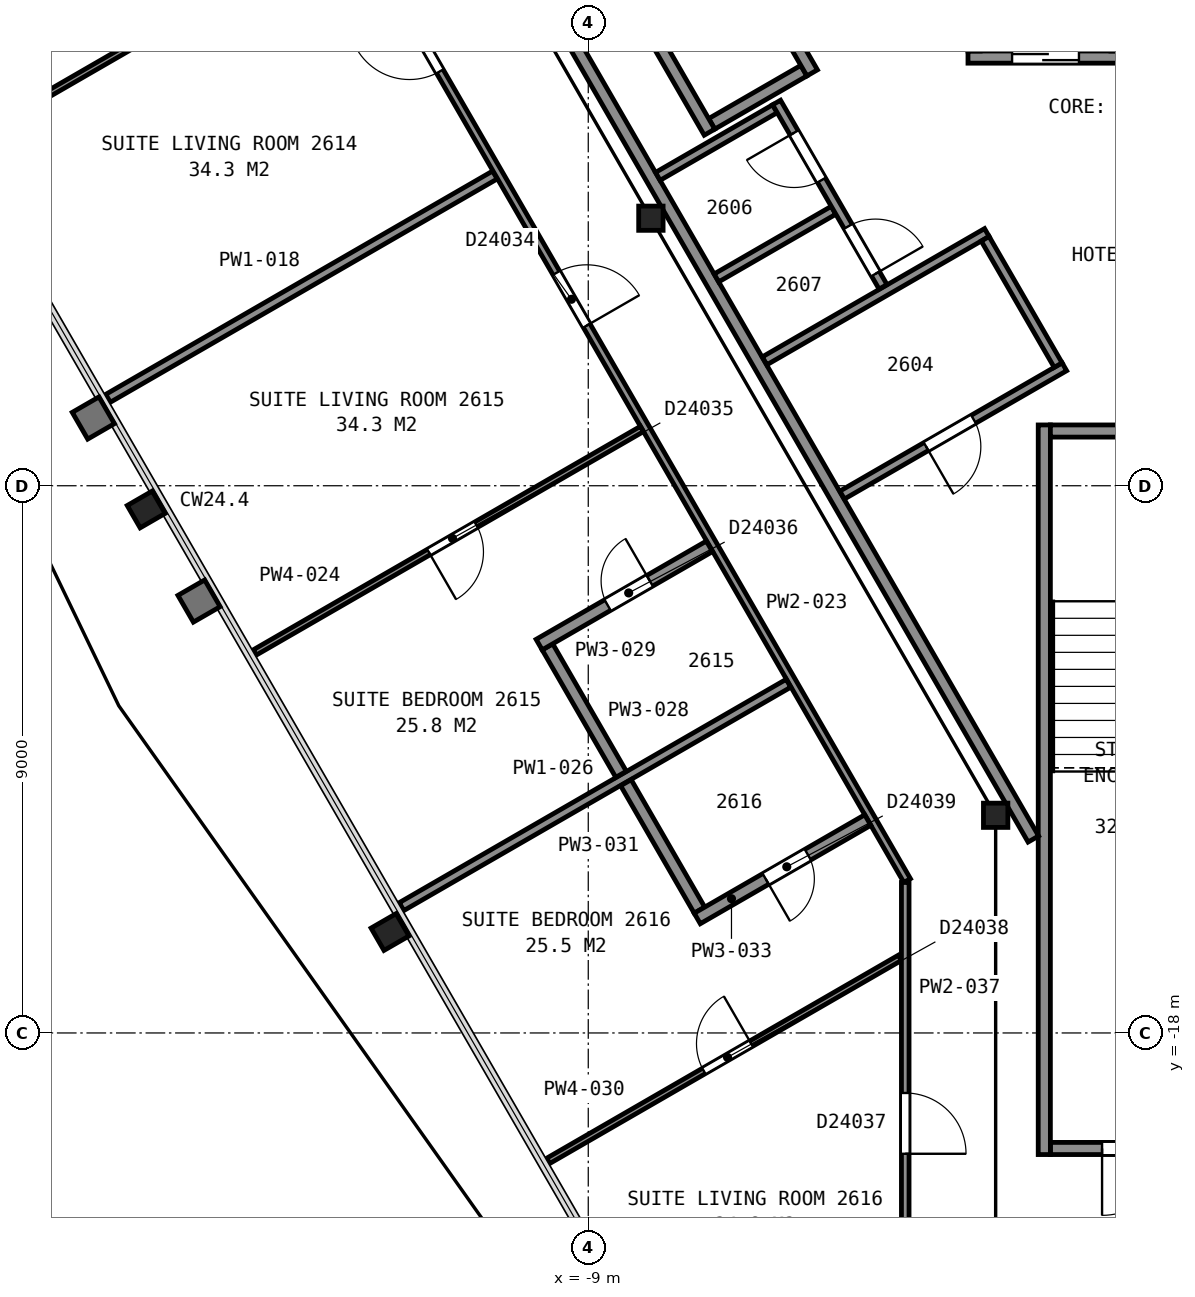
"""IFC4 building model, lengths in metres.
Left out: names, types, materials, properties, quantities, classifications, styles, units other than length and angle.
Written with IfcOpenShell. Run it as: python <this file> out.ifc"""

import sys

from ifc_helpers import new_model, si_unit, direction, frame, frame_2d, origin, origin_2d, place, context, subcontext, project, spatial, rectangle, i_section, extrude, element, fill, save


model = new_model("IFC4")
c1 = context("Model", 3, precision=1e-05, world=origin(), true_north=direction((0.0, 1.0)))
c2 = subcontext(c1, "Body", "Model", "MODEL_VIEW")
j1 = project(units=[si_unit("LENGTHUNIT", "METRE"), si_unit("PLANEANGLEUNIT", "RADIAN")], contexts=[c1])
p1 = place(None, origin())
s1 = spatial("IfcSite", under=j1, at=p1, CompositionType="ELEMENT")
p2 = place(p1, origin())
s2 = spatial("IfcBuilding", under=s1, at=p2, CompositionType="ELEMENT")
p3 = place(p2, frame((0.0, 0.0, 110.8)))
s3 = spatial("IfcBuildingStorey", under=s2, at=p3, CompositionType="ELEMENT", Elevation=110.8)
for number, where, z_axis, x_axis in (
    (1, (-16.27, -9.39, 0.0), (0.0, 0.0, 1.0), (-0.5, 0.866, 0.0)),
    (2, (-12.26, -16.34, 0.0), (0.0, 0.0, 1.0), (-0.5, 0.866, 0.0)),
):
    element("IfcColumn", number, at=place(p3, frame(where, z_axis=z_axis, x_axis=x_axis)), inside=s3, PredefinedType="COLUMN", context=c2, shape_type="SweptSolid", body=[
        extrude(i_section(OverallWidth=0.424, OverallDepth=0.475, WebThickness=0.048, FlangeThickness=0.077, FilletRadius=0.015, at=origin_2d()), origin(), (0.0, 0.0, 1.0), 3.6),
    ])
for number, where, z_axis, x_axis in (
    (3, (-7.97, -4.6, 0.0), (0.0, 0.0, 1.0), (1.0, 0.0, 0.0)),
    (4, (-2.3, -14.42, 0.0), (0.0, 0.0, 1.0), (1.0, 0.0, 0.0)),
):
    element("IfcColumn", number, at=place(p3, frame(where, z_axis=z_axis, x_axis=x_axis)), inside=s3, PredefinedType="COLUMN", context=c2, shape_type="SweptSolid", body=[
        extrude(i_section(OverallWidth=0.401, OverallDepth=0.399, WebThickness=0.025, FlangeThickness=0.04, FilletRadius=0.015, at=origin_2d()), origin(), (0.0, 0.0, 1.0), 3.6),
    ])
p4 = place(p3, frame((-1.4, -19.9, 0.0), z_axis=(0.0, 0.0, 1.0), x_axis=(1.0, 0.0, 0.0)))
e5 = element("IfcWall", 5, at=p4, inside=s3, PredefinedType="PARTITIONING", context=c2, shape_type="SweptSolid", body=[
    extrude(rectangle(XDim=2.8, YDim=0.2, at=frame_2d((1.4, 0.0))), origin(), (0.0, 0.0, 1.0), 3.35),
])
p5 = place(p4, frame((0.85, 0.0, 0.0)))
e6 = element("IfcOpeningElement", 6, at=p5, cuts=e5, PredefinedType="OPENING", context=c2, shape_type="SweptSolid", body=[
    extrude(rectangle(XDim=1.1, YDim=2.1, at=frame_2d((0.55, 1.05))), frame((0.0, 0.11, 0.0), z_axis=(0.0, -1.0, 0.0), x_axis=(1.0, 0.0, 0.0)), (0.0, 0.0, 1.0), 0.22),
])
p6 = place(p3, frame((-1.5, -8.0, 0.0), z_axis=(0.0, 0.0, 1.0), x_axis=(0.0, -1.0, 0.0)))
e7 = element("IfcWall", 7, at=p6, inside=s3, PredefinedType="PARTITIONING", context=c2, shape_type="SweptSolid", body=[
    extrude(rectangle(XDim=12.0, YDim=0.2, at=frame_2d((6.0, 0.0))), origin(), (0.0, 0.0, 1.0), 3.35),
])
p7 = place(p3, frame((-1.4, -8.1, 0.0), z_axis=(0.0, 0.0, 1.0), x_axis=(1.0, 0.0, 0.0)))
e8 = element("IfcWall", 8, at=p7, inside=s3, PredefinedType="PARTITIONING", context=c2, shape_type="SweptSolid", body=[
    extrude(rectangle(XDim=2.8, YDim=0.2, at=frame_2d((1.4, 0.0))), origin(), (0.0, 0.0, 1.0), 3.35),
])
p8 = place(p3, frame((-2.755, -1.95, 0.0), z_axis=(0.0, 0.0, 1.0), x_axis=(1.0, 0.0, 0.0)))
e9 = element("IfcWall", 9, at=p8, inside=s3, PredefinedType="PARTITIONING", context=c2, shape_type="SweptSolid", body=[
    extrude(rectangle(XDim=2.55, YDim=0.2, at=frame_2d((1.275, 0.0))), origin(), (0.0, 0.0, 1.0), 3.6),
])
p9 = place(p8, frame((0.725, 0.0, 0.0)))
e10 = element("IfcOpeningElement", 10, at=p9, cuts=e9, PredefinedType="OPENING", context=c2, shape_type="SweptSolid", body=[
    extrude(rectangle(XDim=1.1, YDim=2.1, at=frame_2d((0.55, 1.05))), frame((0.0, 0.11, 0.0), z_axis=(0.0, -1.0, 0.0), x_axis=(1.0, 0.0, 0.0)), (0.0, 0.0, 1.0), 0.22),
])
p10 = place(p3, frame((-6.97, -3.048, 0.0), z_axis=(0.0, 0.0, 1.0), x_axis=(0.866036909293, 0.499980071345, 0.0)))
e11 = element("IfcWall", 11, at=p10, inside=s3, PredefinedType="PARTITIONING", context=c2, shape_type="SweptSolid", body=[
    extrude(rectangle(XDim=1.75, YDim=0.2, at=frame_2d((0.875, 0.0))), origin(), (0.0, 0.0, 1.0), 3.6),
])
p11 = place(p3, frame((-5.318, -2.21, 0.0), z_axis=(0.0, 0.0, 1.0), x_axis=(-0.499938297808, 0.866061024631, 0.0)))
e12 = element("IfcWall", 12, at=p11, inside=s3, PredefinedType="PARTITIONING", context=c2, shape_type="SweptSolid", body=[
    extrude(rectangle(XDim=2.35, YDim=0.2, at=frame_2d((1.175, 0.0))), origin(), (0.0, 0.0, 1.0), 3.6),
])
p12 = place(p3, frame((-7.006, -3.185, 0.0), z_axis=(0.0, 0.0, 1.0), x_axis=(-0.499990435942, 0.866030925526, 0.0)))
e13 = element("IfcWall", 13, at=p12, inside=s3, PredefinedType="PARTITIONING", context=c2, shape_type="SweptSolid", body=[
    extrude(rectangle(XDim=2.55, YDim=0.2, at=frame_2d((1.275, 0.0))), origin(), (0.0, 0.0, 1.0), 3.6),
])
p13 = place(p3, frame((-13.664, 5.946, 0.0), z_axis=(0.0, 0.0, 1.0), x_axis=(0.499994327219, -0.866028678941, 0.0)))
e14 = element("IfcWall", 14, at=p13, inside=s3, PredefinedType="PARTITIONING", context=c2, shape_type="SweptSolid", body=[
    extrude(rectangle(XDim=23.968, YDim=0.2, at=frame_2d((11.984, 0.0))), origin(), (0.0, 0.0, 1.0), 3.35),
])
p14 = place(p3, frame((-7.856, -3.912, 0.0), z_axis=(0.0, 0.0, 1.0), x_axis=(0.865971748, 0.500092923031, 0.0)))
e15 = element("IfcWall", 15, at=p14, inside=s3, PredefinedType="PARTITIONING", context=c2, shape_type="SweptSolid", body=[
    extrude(rectangle(XDim=2.225, YDim=0.15, at=frame_2d((1.112, 0.0))), origin(), (0.0, 0.0, 1.0), 3.35),
])
p15 = place(p3, frame((-6.892, -5.582, 0.0), z_axis=(0.0, 0.0, 1.0), x_axis=(0.865944298464, 0.500140452231, 0.0)))
e16 = element("IfcWall", 16, at=p15, inside=s3, PredefinedType="PARTITIONING", context=c2, shape_type="SweptSolid", body=[
    extrude(rectangle(XDim=2.224, YDim=0.15, at=frame_2d((1.112, 0.0))), origin(), (0.0, 0.0, 1.0), 3.35),
])
p16 = place(p3, frame((-6.1, -6.946, 0.0), z_axis=(0.0, 0.0, 1.0), x_axis=(0.866038200431, 0.499977834903, 0.0)))
e17 = element("IfcWall", 17, at=p16, inside=s3, PredefinedType="PARTITIONING", context=c2, shape_type="SweptSolid", body=[
    extrude(rectangle(XDim=4.22, YDim=0.15, at=frame_2d((2.11, 0.0))), origin(), (0.0, 0.0, 1.0), 3.35),
])
p17 = place(p3, frame((-4.152, -5.729, 0.0), z_axis=(0.0, 0.0, 1.0), x_axis=(-0.500024287448, 0.866011380966, 0.0)))
e18 = element("IfcWall", 18, at=p17, inside=s3, PredefinedType="PARTITIONING", context=c2, shape_type="SweptSolid", body=[
    extrude(rectangle(XDim=3.501, YDim=0.15, at=frame_2d((1.75, 0.0))), origin(), (0.0, 0.0, 1.0), 3.35),
])
p18 = place(p17, frame((2.026, 0.0, 0.0)))
e19 = element("IfcOpeningElement", 19, at=p18, cuts=e18, PredefinedType="OPENING", context=c2, shape_type="SweptSolid", body=[
    extrude(rectangle(XDim=0.9, YDim=2.1, at=frame_2d((0.45, 1.05))), frame((0.0, 0.085, 0.0), z_axis=(0.0, -1.0, 0.0), x_axis=(1.0, 0.0, 0.0)), (0.0, 0.0, 1.0), 0.17),
])
p19 = place(p17, frame((0.248, 0.0, 0.0)))
e20 = element("IfcOpeningElement", 20, at=p19, cuts=e18, PredefinedType="OPENING", context=c2, shape_type="SweptSolid", body=[
    extrude(rectangle(XDim=0.9, YDim=2.1, at=frame_2d((0.45, 1.05))), frame((0.0, 0.085, 0.0), z_axis=(0.0, -1.0, 0.0), x_axis=(1.0, 0.0, 0.0)), (0.0, 0.0, 1.0), 0.17),
])
p20 = place(p3, frame((-4.825, -9.154, 0.0), z_axis=(0.0, 0.0, 1.0), x_axis=(0.866023738697, 0.500002884005, 0.0)))
e21 = element("IfcWall", 21, at=p20, inside=s3, PredefinedType="PARTITIONING", context=c2, shape_type="SweptSolid", body=[
    extrude(rectangle(XDim=4.22, YDim=0.15, at=frame_2d((2.11, 0.0))), origin(), (0.0, 0.0, 1.0), 3.35),
])
p21 = place(p20, frame((1.595, 0.0, 0.0)))
e22 = element("IfcOpeningElement", 22, at=p21, cuts=e21, PredefinedType="OPENING", context=c2, shape_type="SweptSolid", body=[
    extrude(rectangle(XDim=0.9, YDim=2.1, at=frame_2d((0.45, 1.05))), frame((0.0, 0.085, 0.0), z_axis=(0.0, -1.0, 0.0), x_axis=(1.0, 0.0, 0.0)), (0.0, 0.0, 1.0), 0.17),
])
p22 = place(p3, frame((-2.472, -4.938, 0.0), z_axis=(0.0, 0.0, 1.0), x_axis=(0.500045362686, -0.865999212041, 0.0)))
e23 = element("IfcWall", 23, at=p22, inside=s3, PredefinedType="PARTITIONING", context=c2, shape_type="SweptSolid", body=[
    extrude(rectangle(XDim=2.4, YDim=0.15, at=frame_2d((1.2, 0.0))), origin(), (0.0, 0.0, 1.0), 3.35),
])
p23 = place(p3, frame((-19.311, -3.382, 0.0), z_axis=(0.0, 0.0, 1.0), x_axis=(0.865995225926, 0.500052265941, 0.0)))
e24 = element("IfcWall", 24, at=p23, inside=s3, PredefinedType="PARTITIONING", context=c2, shape_type="SweptSolid", body=[
    extrude(rectangle(XDim=7.347, YDim=0.1, at=frame_2d((3.674, 0.0))), origin(), (0.0, 0.0, 1.0), 2.613),
])
p24 = place(p23, frame((3.303, 0.0, 0.0)))
e25 = element("IfcOpeningElement", 25, at=p24, cuts=e24, PredefinedType="OPENING", context=c2, shape_type="SweptSolid", body=[
    extrude(rectangle(XDim=0.9, YDim=2.1, at=frame_2d((0.45, 1.05))), frame((0.0, 0.06, 0.0), z_axis=(0.0, -1.0, 0.0), x_axis=(1.0, 0.0, 0.0)), (0.0, 0.0, 1.0), 0.12),
])
p25 = place(p3, frame((-16.898, -7.562, 0.0), z_axis=(0.0, 0.0, 1.0), x_axis=(0.866055004685, 0.499948726231, 0.0)))
e26 = element("IfcWall", 26, at=p25, inside=s3, PredefinedType="PARTITIONING", context=c2, shape_type="SweptSolid", body=[
    extrude(rectangle(XDim=7.347, YDim=0.15, at=frame_2d((3.674, 0.0))), origin(), (0.0, 0.0, 1.0), 2.613),
])
p26 = place(p3, frame((-3.756, -15.494, 0.0), z_axis=(0.0, 0.0, 1.0), x_axis=(-0.500027787016, 0.866009360349, 0.0)))
e27 = element("IfcWall", 27, at=p26, inside=s3, PredefinedType="PARTITIONING", context=c2, shape_type="SweptSolid", body=[
    extrude(rectangle(XDim=23.856, YDim=0.125, at=frame_2d((11.928, 0.0))), origin(), (0.0, 0.0, 1.0), 2.613),
])
p27 = place(p26, frame((15.368, 0.0, 0.0)))
e28 = element("IfcOpeningElement", 28, at=p27, cuts=e27, PredefinedType="OPENING", context=c2, shape_type="SweptSolid", body=[
    extrude(rectangle(XDim=1.0, YDim=2.1, at=frame_2d((0.5, 1.05))), frame((0.0, 0.073, 0.0), z_axis=(0.0, -1.0, 0.0), x_axis=(1.0, 0.0, 0.0)), (0.0, 0.0, 1.0), 0.145),
])
p28 = place(p26, frame((10.54, 0.0, 0.0)))
e29 = element("IfcOpeningElement", 29, at=p28, cuts=e27, PredefinedType="OPENING", context=c2, shape_type="SweptSolid", body=[
    extrude(rectangle(XDim=1.0, YDim=2.1, at=frame_2d((0.5, 1.05))), frame((0.0, 0.073, 0.0), z_axis=(0.0, -1.0, 0.0), x_axis=(1.0, 0.0, 0.0)), (0.0, 0.0, 1.0), 0.145),
])
p29 = place(p3, frame((-8.117, -8.066, 0.0), z_axis=(0.0, 0.0, 1.0), x_axis=(-0.866052324842, -0.499953368461, 0.0)))
e30 = element("IfcWall", 30, at=p29, inside=s3, PredefinedType="PARTITIONING", context=c2, shape_type="SweptSolid", body=[
    extrude(rectangle(XDim=7.352, YDim=0.1, at=frame_2d((3.676, 0.0))), origin(), (0.0, 0.0, 1.0), 2.613),
])
p30 = place(p29, frame((3.148, 0.0, 0.0)))
e31 = element("IfcOpeningElement", 31, at=p30, cuts=e30, PredefinedType="OPENING", context=c2, shape_type="SweptSolid", body=[
    extrude(rectangle(XDim=0.9, YDim=2.1, at=frame_2d((0.45, 1.05))), frame((0.0, 0.06, 0.0), z_axis=(0.0, -1.0, 0.0), x_axis=(1.0, 0.0, 0.0)), (0.0, 0.0, 1.0), 0.12),
])
p31 = place(p3, frame((-12.071, -15.922, 0.0), z_axis=(0.0, 0.0, 1.0), x_axis=(0.866063309627, 0.499934339407, 0.0)))
e32 = element("IfcWall", 32, at=p31, inside=s3, PredefinedType="PARTITIONING", context=c2, shape_type="SweptSolid", body=[
    extrude(rectangle(XDim=7.348, YDim=0.15, at=frame_2d((3.674, 0.0))), origin(), (0.0, 0.0, 1.0), 2.613),
])
p32 = place(p3, frame((-9.671, -11.65, 0.0), z_axis=(0.0, 0.0, 1.0), x_axis=(0.50002218001, -0.866012597771, 0.0)))
e33 = element("IfcWall", 33, at=p32, inside=s3, PredefinedType="PARTITIONING", context=c2, shape_type="SweptSolid", body=[
    extrude(rectangle(XDim=2.421, YDim=0.2, at=frame_2d((1.21, 0.0))), origin(), (0.0, 0.0, 1.0), 2.613),
])
p33 = place(p3, frame((-7.008, -9.997, 0.0), z_axis=(0.0, 0.0, 1.0), x_axis=(-0.866078705744, -0.499907666931, 0.0)))
e34 = element("IfcWall", 34, at=p33, inside=s3, PredefinedType="PARTITIONING", context=c2, shape_type="SweptSolid", body=[
    extrude(rectangle(XDim=3.233, YDim=0.2, at=frame_2d((1.616, 0.0))), origin(), (0.0, 0.0, 1.0), 2.613),
])
p34 = place(p33, frame((1.133, 0.0, 0.0)))
e35 = element("IfcOpeningElement", 35, at=p34, cuts=e34, PredefinedType="OPENING", context=c2, shape_type="SweptSolid", body=[
    extrude(rectangle(XDim=0.8, YDim=2.1, at=frame_2d((0.4, 1.05))), frame((0.0, 0.11, 0.0), z_axis=(0.0, -1.0, 0.0), x_axis=(1.0, 0.0, 0.0)), (0.0, 0.0, 1.0), 0.22),
])
p35 = place(p3, frame((-9.657, -20.103, 0.0), z_axis=(0.0, 0.0, 1.0), x_axis=(0.865979781901, 0.500079011097, 0.0)))
e36 = element("IfcWall", 36, at=p35, inside=s3, PredefinedType="PARTITIONING", context=c2, shape_type="SweptSolid", body=[
    extrude(rectangle(XDim=6.678, YDim=0.1, at=frame_2d((3.339, 0.0))), origin(), (0.0, 0.0, 1.0), 2.613),
])
p36 = place(p35, frame((2.953, 0.0, 0.0)))
e37 = element("IfcOpeningElement", 37, at=p36, cuts=e36, PredefinedType="OPENING", context=c2, shape_type="SweptSolid", body=[
    extrude(rectangle(XDim=0.9, YDim=2.1, at=frame_2d((0.45, 1.05))), frame((0.0, 0.06, 0.0), z_axis=(0.0, -1.0, 0.0), x_axis=(1.0, 0.0, 0.0)), (0.0, 0.0, 1.0), 0.12),
])
p37 = place(p3, frame((-8.381, -13.884, 0.0), z_axis=(0.0, 0.0, 1.0), x_axis=(0.499795219151, -0.866143601786, 0.0)))
e38 = element("IfcWall", 38, at=p37, inside=s3, PredefinedType="PARTITIONING", context=c2, shape_type="SweptSolid", body=[
    extrude(rectangle(XDim=2.42, YDim=0.2, at=frame_2d((1.21, 0.0))), origin(), (0.0, 0.0, 1.0), 2.613),
])
p38 = place(p3, frame((-7.208, -16.117, 0.0), z_axis=(0.0, 0.0, 1.0), x_axis=(0.866091428368, 0.499885624626, 0.0)))
e39 = element("IfcWall", 39, at=p38, inside=s3, PredefinedType="PARTITIONING", context=c2, shape_type="SweptSolid", body=[
    extrude(rectangle(XDim=3.238, YDim=0.2, at=frame_2d((1.619, 0.0))), origin(), (0.0, 0.0, 1.0), 2.613),
])
p39 = place(p38, frame((1.3, 0.0, 0.0)))
e40 = element("IfcOpeningElement", 40, at=p39, cuts=e39, PredefinedType="OPENING", context=c2, shape_type="SweptSolid", body=[
    extrude(rectangle(XDim=0.8, YDim=2.1, at=frame_2d((0.4, 1.05))), frame((0.0, 0.11, 0.0), z_axis=(0.0, -1.0, 0.0), x_axis=(1.0, 0.0, 0.0)), (0.0, 0.0, 1.0), 0.22),
])
p40 = place(p3, frame((-3.787, -22.722, 0.0), z_axis=(0.0, 0.0, 1.0), x_axis=(0.0, 1.0, 0.0)))
e41 = element("IfcWall", 41, at=p40, inside=s3, PredefinedType="PARTITIONING", context=c2, shape_type="SweptSolid", body=[
    extrude(rectangle(XDim=7.197, YDim=0.125, at=frame_2d((3.599, 0.0))), origin(), (0.0, 0.0, 1.0), 2.613),
])
p41 = place(p40, frame((2.735, 0.0, 0.0)))
e42 = element("IfcOpeningElement", 42, at=p41, cuts=e41, PredefinedType="OPENING", context=c2, shape_type="SweptSolid", body=[
    extrude(rectangle(XDim=1.0, YDim=2.1, at=frame_2d((0.5, 1.05))), frame((0.0, 0.073, 0.0), z_axis=(0.0, -1.0, 0.0), x_axis=(1.0, 0.0, 0.0)), (0.0, 0.0, 1.0), 0.145),
])
p42 = place(p5, origin())
e43 = element("IfcDoor", 43, at=p42, inside=s3, OperationType="SINGLE_SWING_LEFT", PredefinedType="DOOR", context=c2, shape_type="SweptSolid", body=[
    extrude(rectangle(XDim=1.1, YDim=2.1, at=frame_2d((0.55, 1.05))), frame((0.0, 0.025, 0.0), z_axis=(0.0, -1.0, 0.0), x_axis=(1.0, 0.0, 0.0)), (0.0, 0.0, 1.0), 0.05),
])
fill(e6, e43)
p43 = place(p9, origin())
e44 = element("IfcDoor", 44, at=p43, inside=s3, OperationType="SLIDING_TO_RIGHT", PredefinedType="DOOR", context=c2, shape_type="SweptSolid", body=[
    extrude(rectangle(XDim=1.1, YDim=2.1, at=frame_2d((0.55, 1.05))), frame((0.0, 0.025, 0.0), z_axis=(0.0, -1.0, 0.0), x_axis=(1.0, 0.0, 0.0)), (0.0, 0.0, 1.0), 0.05),
])
fill(e10, e44)
p44 = place(p18, origin())
e45 = element("IfcDoor", 45, at=p44, inside=s3, OperationType="SINGLE_SWING_RIGHT", PredefinedType="DOOR", context=c2, shape_type="SweptSolid", body=[
    extrude(rectangle(XDim=0.9, YDim=2.1, at=frame_2d((0.45, 1.05))), frame((0.0, 0.025, 0.0), z_axis=(0.0, -1.0, 0.0), x_axis=(1.0, 0.0, 0.0)), (0.0, 0.0, 1.0), 0.05),
])
fill(e19, e45)
p45 = place(p19, origin())
e46 = element("IfcDoor", 46, at=p45, inside=s3, OperationType="SINGLE_SWING_LEFT", PredefinedType="DOOR", context=c2, shape_type="SweptSolid", body=[
    extrude(rectangle(XDim=0.9, YDim=2.1, at=frame_2d((0.45, 1.05))), frame((0.0, 0.025, 0.0), z_axis=(0.0, -1.0, 0.0), x_axis=(1.0, 0.0, 0.0)), (0.0, 0.0, 1.0), 0.05),
])
fill(e20, e46)
p46 = place(p21, origin())
e47 = element("IfcDoor", 47, at=p46, inside=s3, OperationType="SINGLE_SWING_LEFT", PredefinedType="DOOR", context=c2, shape_type="SweptSolid", body=[
    extrude(rectangle(XDim=0.9, YDim=2.1, at=frame_2d((0.45, 1.05))), frame((0.0, 0.025, 0.0), z_axis=(0.0, -1.0, 0.0), x_axis=(1.0, 0.0, 0.0)), (0.0, 0.0, 1.0), 0.05),
])
fill(e22, e47)
p47 = place(p27, origin())
e48 = element("IfcDoor", 48, at=p47, inside=s3, OperationType="SINGLE_SWING_RIGHT", PredefinedType="DOOR", context=c2, shape_type="SweptSolid", body=[
    extrude(rectangle(XDim=1.0, YDim=2.1, at=frame_2d((0.5, 1.05))), frame((0.0, 0.025, 0.0), z_axis=(0.0, -1.0, 0.0), x_axis=(1.0, 0.0, 0.0)), (0.0, 0.0, 1.0), 0.05),
])
fill(e28, e48)
p48 = place(p28, origin())
e49 = element("IfcDoor", 49, at=p48, inside=s3, OperationType="SINGLE_SWING_LEFT", PredefinedType="DOOR", context=c2, shape_type="SweptSolid", body=[
    extrude(rectangle(XDim=1.0, YDim=2.1, at=frame_2d((0.5, 1.05))), frame((0.0, 0.025, 0.0), z_axis=(0.0, -1.0, 0.0), x_axis=(1.0, 0.0, 0.0)), (0.0, 0.0, 1.0), 0.05),
])
fill(e29, e49)
p49 = place(p30, origin())
e50 = element("IfcDoor", 50, at=p49, inside=s3, OperationType="SINGLE_SWING_RIGHT", PredefinedType="DOOR", context=c2, shape_type="SweptSolid", body=[
    extrude(rectangle(XDim=0.9, YDim=2.1, at=frame_2d((0.45, 1.05))), frame((0.0, 0.025, 0.0), z_axis=(0.0, -1.0, 0.0), x_axis=(1.0, 0.0, 0.0)), (0.0, 0.0, 1.0), 0.05),
])
fill(e31, e50)
p50 = place(p34, origin())
e51 = element("IfcDoor", 51, at=p50, inside=s3, OperationType="SINGLE_SWING_LEFT", PredefinedType="DOOR", context=c2, shape_type="SweptSolid", body=[
    extrude(rectangle(XDim=0.8, YDim=2.1, at=frame_2d((0.4, 1.05))), frame((0.0, 0.025, 0.0), z_axis=(0.0, -1.0, 0.0), x_axis=(1.0, 0.0, 0.0)), (0.0, 0.0, 1.0), 0.05),
])
fill(e35, e51)
p51 = place(p36, origin())
e52 = element("IfcDoor", 52, at=p51, inside=s3, OperationType="SINGLE_SWING_RIGHT", PredefinedType="DOOR", context=c2, shape_type="SweptSolid", body=[
    extrude(rectangle(XDim=0.9, YDim=2.1, at=frame_2d((0.45, 1.05))), frame((0.0, 0.025, 0.0), z_axis=(0.0, -1.0, 0.0), x_axis=(1.0, 0.0, 0.0)), (0.0, 0.0, 1.0), 0.05),
])
fill(e37, e52)
p52 = place(p39, origin())
e53 = element("IfcDoor", 53, at=p52, inside=s3, OperationType="SINGLE_SWING_LEFT", PredefinedType="DOOR", context=c2, shape_type="SweptSolid", body=[
    extrude(rectangle(XDim=0.8, YDim=2.1, at=frame_2d((0.4, 1.05))), frame((0.0, 0.025, 0.0), z_axis=(0.0, -1.0, 0.0), x_axis=(1.0, 0.0, 0.0)), (0.0, 0.0, 1.0), 0.05),
])
fill(e40, e53)
p53 = place(p41, origin())
e54 = element("IfcDoor", 54, at=p53, inside=s3, OperationType="SINGLE_SWING_LEFT", PredefinedType="DOOR", context=c2, shape_type="SweptSolid", body=[
    extrude(rectangle(XDim=1.0, YDim=2.1, at=frame_2d((0.5, 1.05))), frame((0.0, 0.025, 0.0), z_axis=(0.0, -1.0, 0.0), x_axis=(1.0, 0.0, 0.0)), (0.0, 0.0, 1.0), 0.05),
])
fill(e42, e54)
save(model, sys.argv[1])
